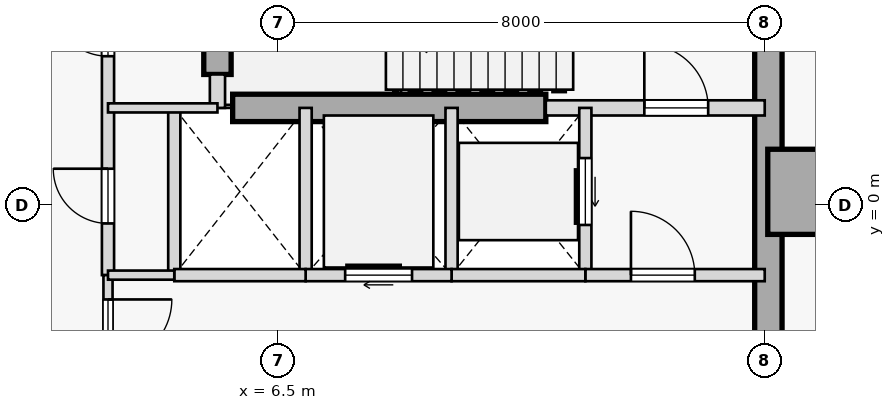
"""IFC4 building model, lengths in metres.
Left out: names, types, materials, properties, quantities, classifications, styles, units other than length and angle.
Written with IfcOpenShell. Run it as: python <this file> out.ifc"""

import sys

from ifc_helpers import new_model, si_unit, direction, frame, frame_2d, origin, origin_2d, place, context, subcontext, project, spatial, rectangle, extrude, element, fill, save


model = new_model("IFC4")
c1 = context("Model", 3, precision=1e-05, world=origin(), true_north=direction((0.0, 1.0)))
c2 = subcontext(c1, "Body", "Model", "MODEL_VIEW")
j1 = project(units=[si_unit("LENGTHUNIT", "METRE"), si_unit("PLANEANGLEUNIT", "RADIAN")], contexts=[c1])
p1 = place(None, origin())
s1 = spatial("IfcSite", under=j1, at=p1, CompositionType="ELEMENT")
p2 = place(p1, origin())
s2 = spatial("IfcBuilding", under=s1, at=p2, CompositionType="ELEMENT")
p3 = place(p2, frame((0.0, 0.0, 52.2)))
s3 = spatial("IfcBuildingStorey", under=s2, at=p3, CompositionType="ELEMENT", Elevation=52.2)
p4 = place(p3, frame((15.25, 0.22, 0.0), z_axis=(0.0, 0.0, 1.0), x_axis=(1.0, 0.0, 0.0)))
e1 = element("IfcColumn", 1, at=p4, inside=s3, PredefinedType="COLUMN", context=c2, shape_type="SweptSolid", body=[
    extrude(rectangle(XDim=1.4, YDim=1.4, at=origin_2d()), origin(), (0.0, 0.0, 1.0), 3.8),
])
p5 = place(p3, frame((14.56, -5.375, 0.0), z_axis=(0.0, 0.0, 1.0), x_axis=(0.0, 1.0, 0.0)))
e2 = element("IfcWall", 2, at=p5, inside=s3, PredefinedType="SHEAR", context=c2, shape_type="SweptSolid", body=[
    extrude(rectangle(XDim=10.75, YDim=0.45, at=frame_2d((5.375, 0.0))), origin(), (0.0, 0.0, 1.0), 3.575),
])
p6 = place(p3, frame((5.5, 2.15, 0.0), z_axis=(0.0, 0.0, 1.0), x_axis=(0.0, 1.0, 0.0)))
e3 = element("IfcWall", 3, at=p6, inside=s3, PredefinedType="SHEAR", context=c2, shape_type="SweptSolid", body=[
    extrude(rectangle(XDim=3.225, YDim=0.45, at=frame_2d((1.613, 0.0))), origin(), (0.0, 0.0, 1.0), 3.575),
])
p7 = place(p3, frame((5.75, 1.6, 0.0), z_axis=(0.0, 0.0, 1.0), x_axis=(1.0, 0.0, 0.0)))
e4 = element("IfcWall", 4, at=p7, inside=s3, PredefinedType="SHEAR", context=c2, shape_type="SweptSolid", body=[
    extrude(rectangle(XDim=5.15, YDim=0.45, at=frame_2d((2.575, 0.0))), origin(), (0.0, 0.0, 1.0), 3.575),
])
p8 = place(p3, frame((10.9, 1.6, 0.0), z_axis=(0.0, 0.0, 1.0), x_axis=(1.0, 0.0, 0.0)))
e5 = element("IfcWall", 5, at=p8, inside=s3, PredefinedType="STANDARD", context=c2, shape_type="SweptSolid", body=[
    extrude(rectangle(XDim=3.6, YDim=0.25, at=frame_2d((1.8, 0.0))), origin(), (0.0, 0.0, 1.0), 3.575),
])
p9 = place(p8, frame((1.62, 0.0, 0.0)))
e6 = element("IfcOpeningElement", 6, at=p9, cuts=e5, PredefinedType="OPENING", context=c2, shape_type="SweptSolid", body=[
    extrude(rectangle(XDim=1.05, YDim=2.15, at=frame_2d((0.525, 1.075))), frame((0.0, 0.135, 0.0), z_axis=(0.0, -1.0, 0.0), x_axis=(1.0, 0.0, 0.0)), (0.0, 0.0, 1.0), 0.27),
])
p10 = place(p3, frame((5.5, 1.6, 0.0), z_axis=(0.0, 0.0, 1.0), x_axis=(0.0, 1.0, 0.0)))
e7 = element("IfcWall", 7, at=p10, inside=s3, PredefinedType="STANDARD", context=c2, shape_type="SweptSolid", body=[
    extrude(rectangle(XDim=0.55, YDim=0.25, at=frame_2d((0.275, 0.0))), origin(), (0.0, 0.0, 1.0), 3.575),
])
p11 = place(p3, frame((3.7, -1.15, 0.0), z_axis=(0.0, 0.0, 1.0), x_axis=(0.0, 1.0, 0.0)))
e8 = element("IfcWall", 8, at=p11, inside=s3, PredefinedType="STANDARD", context=c2, shape_type="SweptSolid", body=[
    extrude(rectangle(XDim=6.75, YDim=0.2, at=frame_2d((3.375, 0.0))), origin(), (0.0, 0.0, 1.0), 3.575),
])
p12 = place(p11, frame((3.6, 0.0, 0.0)))
e9 = element("IfcOpeningElement", 9, at=p12, cuts=e8, PredefinedType="OPENING", context=c2, shape_type="SweptSolid", body=[
    extrude(rectangle(XDim=0.92, YDim=2.15, at=frame_2d((0.46, 1.075))), frame((0.0, 0.11, 0.0), z_axis=(0.0, -1.0, 0.0), x_axis=(1.0, 0.0, 0.0)), (0.0, 0.0, 1.0), 0.22),
])
p13 = place(p11, frame((0.85, 0.0, 0.0)))
e10 = element("IfcOpeningElement", 10, at=p13, cuts=e8, PredefinedType="OPENING", context=c2, shape_type="SweptSolid", body=[
    extrude(rectangle(XDim=0.9, YDim=2.15, at=frame_2d((0.45, 1.075))), frame((0.0, 0.11, 0.0), z_axis=(0.0, -1.0, 0.0), x_axis=(1.0, 0.0, 0.0)), (0.0, 0.0, 1.0), 0.22),
])
p14 = place(p3, frame((3.7, -2.95, 0.0), z_axis=(0.0, 0.0, 1.0), x_axis=(0.0, 1.0, 0.0)))
e11 = element("IfcWall", 11, at=p14, inside=s3, PredefinedType="PARTITIONING", context=c2, shape_type="SweptSolid", body=[
    extrude(rectangle(XDim=1.8, YDim=0.15, at=frame_2d((0.9, 0.0))), origin(), (0.0, 0.0, 1.0), 3.575),
])
p15 = place(p14, frame((0.35, 0.0, 0.0)))
e12 = element("IfcOpeningElement", 12, at=p15, cuts=e11, PredefinedType="OPENING", context=c2, shape_type="SweptSolid", body=[
    extrude(rectangle(XDim=1.05, YDim=2.18, at=frame_2d((0.525, 1.09))), frame((0.0, 0.085, 0.0), z_axis=(0.0, -1.0, 0.0), x_axis=(1.0, 0.0, 0.0)), (0.0, 0.0, 1.0), 0.17),
])
p16 = place(p3, frame((11.55, -1.15, 0.0), z_axis=(0.0, 0.0, 1.0), x_axis=(0.0, 1.0, 0.0)))
e13 = element("IfcWall", 13, at=p16, inside=s3, PredefinedType="STANDARD", context=c2, shape_type="SweptSolid", body=[
    extrude(rectangle(XDim=2.75, YDim=0.2, at=frame_2d((1.375, 0.0))), origin(), (0.0, 0.0, 1.0), 3.575),
])
p17 = place(p16, frame((0.825, 0.0, 0.0)))
e14 = element("IfcOpeningElement", 14, at=p17, cuts=e13, PredefinedType="OPENING", context=c2, shape_type="SweptSolid", body=[
    extrude(rectangle(XDim=1.1, YDim=2.15, at=frame_2d((0.55, 1.075))), frame((0.0, 0.11, 0.0), z_axis=(0.0, -1.0, 0.0), x_axis=(1.0, 0.0, 0.0)), (0.0, 0.0, 1.0), 0.22),
])
p18 = place(p3, frame((9.35, -1.15, 0.0), z_axis=(0.0, 0.0, 1.0), x_axis=(0.0, 1.0, 0.0)))
e15 = element("IfcWall", 15, at=p18, inside=s3, PredefinedType="STANDARD", context=c2, shape_type="SweptSolid", body=[
    extrude(rectangle(XDim=2.75, YDim=0.2, at=frame_2d((1.375, 0.0))), origin(), (0.0, 0.0, 1.0), 3.575),
])
p19 = place(p3, frame((11.55, -1.15, 0.0), z_axis=(0.0, 0.0, 1.0), x_axis=(1.0, 0.0, 0.0)))
e16 = element("IfcWall", 16, at=p19, inside=s3, PredefinedType="STANDARD", context=c2, shape_type="SweptSolid", body=[
    extrude(rectangle(XDim=2.95, YDim=0.2, at=frame_2d((1.475, 0.0))), origin(), (0.0, 0.0, 1.0), 3.575),
])
p20 = place(p19, frame((0.75, 0.0, 0.0)))
e17 = element("IfcOpeningElement", 17, at=p20, cuts=e16, PredefinedType="OPENING", context=c2, shape_type="SweptSolid", body=[
    extrude(rectangle(XDim=1.05, YDim=2.18, at=frame_2d((0.525, 1.09))), frame((0.0, 0.11, 0.0), z_axis=(0.0, -1.0, 0.0), x_axis=(1.0, 0.0, 0.0)), (0.0, 0.0, 1.0), 0.22),
])
p21 = place(p3, frame((9.35, -1.15, 0.0), z_axis=(0.0, 0.0, 1.0), x_axis=(1.0, 0.0, 0.0)))
e18 = element("IfcWall", 18, at=p21, inside=s3, PredefinedType="STANDARD", context=c2, shape_type="SweptSolid", body=[
    extrude(rectangle(XDim=2.2, YDim=0.2, at=frame_2d((1.1, 0.0))), origin(), (0.0, 0.0, 1.0), 3.575),
])
p22 = place(p3, frame((6.95, -1.15, 0.0), z_axis=(0.0, 0.0, 1.0), x_axis=(0.0, 1.0, 0.0)))
e19 = element("IfcWall", 19, at=p22, inside=s3, PredefinedType="STANDARD", context=c2, shape_type="SweptSolid", body=[
    extrude(rectangle(XDim=2.75, YDim=0.2, at=frame_2d((1.375, 0.0))), origin(), (0.0, 0.0, 1.0), 3.575),
])
p23 = place(p3, frame((6.95, -1.15, 0.0), z_axis=(0.0, 0.0, 1.0), x_axis=(1.0, 0.0, 0.0)))
e20 = element("IfcWall", 20, at=p23, inside=s3, PredefinedType="STANDARD", context=c2, shape_type="SweptSolid", body=[
    extrude(rectangle(XDim=2.4, YDim=0.2, at=frame_2d((1.2, 0.0))), origin(), (0.0, 0.0, 1.0), 3.575),
])
p24 = place(p23, frame((0.65, 0.0, 0.0)))
e21 = element("IfcOpeningElement", 21, at=p24, cuts=e20, PredefinedType="OPENING", context=c2, shape_type="SweptSolid", body=[
    extrude(rectangle(XDim=1.1, YDim=2.15, at=frame_2d((0.55, 1.075))), frame((0.0, 0.11, 0.0), z_axis=(0.0, -1.0, 0.0), x_axis=(1.0, 0.0, 0.0)), (0.0, 0.0, 1.0), 0.22),
])
p25 = place(p3, frame((4.79, -1.15, 0.0), z_axis=(0.0, 0.0, 1.0), x_axis=(0.0, 1.0, 0.0)))
e22 = element("IfcWall", 22, at=p25, inside=s3, PredefinedType="STANDARD", context=c2, shape_type="SweptSolid", body=[
    extrude(rectangle(XDim=2.75, YDim=0.2, at=frame_2d((1.375, 0.0))), origin(), (0.0, 0.0, 1.0), 3.575),
])
p26 = place(p3, frame((4.79, -1.15, 0.0), z_axis=(0.0, 0.0, 1.0), x_axis=(1.0, 0.0, 0.0)))
e23 = element("IfcWall", 23, at=p26, inside=s3, PredefinedType="STANDARD", context=c2, shape_type="SweptSolid", body=[
    extrude(rectangle(XDim=2.16, YDim=0.2, at=frame_2d((1.08, 0.0))), origin(), (0.0, 0.0, 1.0), 3.575),
])
p27 = place(p3, frame((3.7, -1.15, 0.0), z_axis=(0.0, 0.0, 1.0), x_axis=(1.0, 0.0, 0.0)))
e24 = element("IfcWall", 24, at=p27, inside=s3, PredefinedType="PARTITIONING", context=c2, shape_type="SweptSolid", body=[
    extrude(rectangle(XDim=1.09, YDim=0.15, at=frame_2d((0.545, 0.0))), origin(), (0.0, 0.0, 1.0), 3.575),
])
p28 = place(p3, frame((3.7, 1.6, 0.0), z_axis=(0.0, 0.0, 1.0), x_axis=(1.0, 0.0, 0.0)))
e25 = element("IfcWall", 25, at=p28, inside=s3, PredefinedType="PARTITIONING", context=c2, shape_type="SweptSolid", body=[
    extrude(rectangle(XDim=1.8, YDim=0.15, at=frame_2d((0.9, 0.0))), origin(), (0.0, 0.0, 1.0), 3.575),
])
p29 = place(p9, origin())
e26 = element("IfcDoor", 26, at=p29, inside=s3, OperationType="SINGLE_SWING_LEFT", PredefinedType="DOOR", context=c2, shape_type="SweptSolid", body=[
    extrude(rectangle(XDim=1.05, YDim=2.15, at=frame_2d((0.525, 1.075))), frame((0.0, 0.025, 0.0), z_axis=(0.0, -1.0, 0.0), x_axis=(1.0, 0.0, 0.0)), (0.0, 0.0, 1.0), 0.05),
])
fill(e6, e26)
p30 = place(p20, origin())
e27 = element("IfcDoor", 27, at=p30, inside=s3, OperationType="SINGLE_SWING_LEFT", PredefinedType="DOOR", context=c2, shape_type="SweptSolid", body=[
    extrude(rectangle(XDim=1.05, YDim=2.18, at=frame_2d((0.525, 1.09))), frame((0.0, 0.025, 0.0), z_axis=(0.0, -1.0, 0.0), x_axis=(1.0, 0.0, 0.0)), (0.0, 0.0, 1.0), 0.05),
])
fill(e17, e27)
p31 = place(p15, frame((1.05, 0.0, 0.0), z_axis=(0.0, 0.0, 1.0), x_axis=(-1.0, 0.0, 0.0)))
e28 = element("IfcDoor", 28, at=p31, inside=s3, OperationType="SINGLE_SWING_RIGHT", PredefinedType="DOOR", context=c2, shape_type="SweptSolid", body=[
    extrude(rectangle(XDim=1.05, YDim=2.18, at=frame_2d((0.525, 1.09))), frame((0.0, 0.025, 0.0), z_axis=(0.0, -1.0, 0.0), x_axis=(1.0, 0.0, 0.0)), (0.0, 0.0, 1.0), 0.05),
])
fill(e12, e28)
p32 = place(p17, origin())
e29 = element("IfcDoor", 29, at=p32, inside=s3, OperationType="SLIDING_TO_RIGHT", PredefinedType="DOOR", context=c2, shape_type="SweptSolid", body=[
    extrude(rectangle(XDim=1.1, YDim=2.15, at=frame_2d((0.55, 1.075))), frame((0.0, 0.025, 0.0), z_axis=(0.0, -1.0, 0.0), x_axis=(1.0, 0.0, 0.0)), (0.0, 0.0, 1.0), 0.05),
])
fill(e14, e29)
p33 = place(p24, origin())
e30 = element("IfcDoor", 30, at=p33, inside=s3, OperationType="SLIDING_TO_RIGHT", PredefinedType="DOOR", context=c2, shape_type="SweptSolid", body=[
    extrude(rectangle(XDim=1.1, YDim=2.15, at=frame_2d((0.55, 1.075))), frame((0.0, 0.025, 0.0), z_axis=(0.0, -1.0, 0.0), x_axis=(1.0, 0.0, 0.0)), (0.0, 0.0, 1.0), 0.05),
])
fill(e21, e30)
p34 = place(p12, origin())
e31 = element("IfcDoor", 31, at=p34, inside=s3, OperationType="SINGLE_SWING_RIGHT", PredefinedType="DOOR", context=c2, shape_type="SweptSolid", body=[
    extrude(rectangle(XDim=0.92, YDim=2.15, at=frame_2d((0.46, 1.075))), frame((0.0, 0.025, 0.0), z_axis=(0.0, -1.0, 0.0), x_axis=(1.0, 0.0, 0.0)), (0.0, 0.0, 1.0), 0.05),
])
fill(e9, e31)
p35 = place(p13, origin())
e32 = element("IfcDoor", 32, at=p35, inside=s3, OperationType="SINGLE_SWING_RIGHT", PredefinedType="DOOR", context=c2, shape_type="SweptSolid", body=[
    extrude(rectangle(XDim=0.9, YDim=2.15, at=frame_2d((0.45, 1.075))), frame((0.0, 0.025, 0.0), z_axis=(0.0, -1.0, 0.0), x_axis=(1.0, 0.0, 0.0)), (0.0, 0.0, 1.0), 0.05),
])
fill(e10, e32)
save(model, sys.argv[1])
